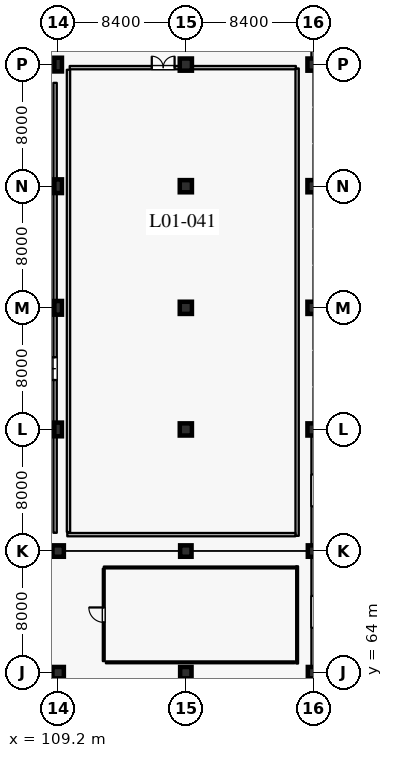
"""IFC4 building model, lengths in metres.
Left out: names, types, materials, properties, quantities, classifications, styles, units other than length and angle.
Written with IfcOpenShell. Run it as: python <this file> out.ifc"""

import sys

from ifc_helpers import new_model, si_unit, direction, frame, frame_2d, origin, origin_2d, place, context, subcontext, project, spatial, rectangle, hollow_rectangle, extrude, element, fill, save


model = new_model("IFC4")
c1 = context("Model", 3, precision=1e-05, world=origin(), true_north=direction((0.0, 1.0)))
c2 = subcontext(c1, "Body", "Model", "MODEL_VIEW")
j1 = project(units=[si_unit("LENGTHUNIT", "METRE"), si_unit("PLANEANGLEUNIT", "RADIAN")], contexts=[c1])
p1 = place(None, origin())
s1 = spatial("IfcSite", under=j1, at=p1, CompositionType="ELEMENT")
p2 = place(p1, origin())
s2 = spatial("IfcBuilding", under=s1, at=p2, CompositionType="ELEMENT")
p3 = place(p2, frame((0.0, 0.0, 6.0)))
s3 = spatial("IfcBuildingStorey", under=s2, at=p3, CompositionType="ELEMENT", Elevation=6.0)
for number, where, z_axis, x_axis in (
    (1, (109.2, 64.0, 0.0), (0.0, 0.0, 1.0), (1.0, 0.0, 0.0)),
    (2, (109.2, 72.0, 0.0), (0.0, 0.0, 1.0), (1.0, 0.0, 0.0)),
):
    element("IfcColumn", number, at=place(p3, frame(where, z_axis=z_axis, x_axis=x_axis)), inside=s3, PredefinedType="COLUMN", context=c2, shape_type="SweptSolid", body=[
        extrude(rectangle(XDim=0.75, YDim=0.75, at=origin_2d()), origin(), (0.0, 0.0, 1.0), 5.4),
    ])
for number, where, z_axis, x_axis in (
    (3, (109.2, 80.0, 0.0), (0.0, 0.0, 1.0), (1.0, 0.0, 0.0)),
    (4, (109.2, 88.0, 0.0), (0.0, 0.0, 1.0), (1.0, 0.0, 0.0)),
    (5, (109.2, 96.0, 0.0), (0.0, 0.0, 1.0), (1.0, 0.0, 0.0)),
    (6, (109.2, 104.0, 0.0), (0.0, 0.0, 1.0), (1.0, 0.0, 0.0)),
):
    element("IfcColumn", number, at=place(p3, frame(where, z_axis=z_axis, x_axis=x_axis)), inside=s3, PredefinedType="COLUMN", context=c2, shape_type="SweptSolid", body=[
        extrude(hollow_rectangle(XDim=0.5, YDim=0.9, WallThickness=0.024, at=origin_2d()), origin(), (0.0, 0.0, 1.0), 5.4),
    ])
for number, where, z_axis, x_axis in (
    (7, (117.6, 64.0, 0.0), (0.0, 0.0, 1.0), (1.0, 0.0, 0.0)),
    (8, (117.6, 72.0, 0.0), (0.0, 0.0, 1.0), (1.0, 0.0, 0.0)),
):
    element("IfcColumn", number, at=place(p3, frame(where, z_axis=z_axis, x_axis=x_axis)), inside=s3, PredefinedType="COLUMN", context=c2, shape_type="SweptSolid", body=[
        extrude(rectangle(XDim=0.75, YDim=0.75, at=origin_2d()), origin(), (0.0, 0.0, 1.0), 5.4),
    ])
for number, where, z_axis, x_axis in (
    (9, (117.6, 80.0, 0.0), (0.0, 0.0, 1.0), (1.0, 0.0, 0.0)),
    (10, (117.6, 88.0, 0.0), (0.0, 0.0, 1.0), (1.0, 0.0, 0.0)),
    (11, (117.6, 96.0, 0.0), (0.0, 0.0, 1.0), (1.0, 0.0, 0.0)),
    (12, (117.6, 104.0, 0.0), (0.0, 0.0, 1.0), (1.0, 0.0, 0.0)),
):
    element("IfcColumn", number, at=place(p3, frame(where, z_axis=z_axis, x_axis=x_axis)), inside=s3, PredefinedType="COLUMN", context=c2, shape_type="SweptSolid", body=[
        extrude(rectangle(XDim=0.8, YDim=0.8, at=origin_2d()), origin(), (0.0, 0.0, 1.0), 5.4),
    ])
for number, where, z_axis, x_axis in (
    (13, (126.0, 64.0, 0.0), (0.0, 0.0, 1.0), (1.0, 0.0, 0.0)),
    (14, (126.0, 72.0, 0.0), (0.0, 0.0, 1.0), (1.0, 0.0, 0.0)),
):
    element("IfcColumn", number, at=place(p3, frame(where, z_axis=z_axis, x_axis=x_axis)), inside=s3, PredefinedType="COLUMN", context=c2, shape_type="SweptSolid", body=[
        extrude(rectangle(XDim=0.75, YDim=0.75, at=origin_2d()), origin(), (0.0, 0.0, 1.0), 5.4),
    ])
for number, where, z_axis, x_axis in (
    (15, (126.0, 80.0, 0.0), (0.0, 0.0, 1.0), (1.0, 0.0, 0.0)),
    (16, (126.0, 88.0, 0.0), (0.0, 0.0, 1.0), (1.0, 0.0, 0.0)),
    (17, (126.0, 96.0, 0.0), (0.0, 0.0, 1.0), (1.0, 0.0, 0.0)),
    (18, (126.0, 104.0, 0.0), (0.0, 0.0, 1.0), (1.0, 0.0, 0.0)),
):
    element("IfcColumn", number, at=place(p3, frame(where, z_axis=z_axis, x_axis=x_axis)), inside=s3, PredefinedType="COLUMN", context=c2, shape_type="SweptSolid", body=[
        extrude(rectangle(XDim=0.8, YDim=0.8, at=origin_2d()), origin(), (0.0, 0.0, 1.0), 5.4),
    ])
p4 = place(p3, frame((126.0, 79.6, 0.0), z_axis=(0.0, 0.0, 1.0), x_axis=(0.0, -1.0, 0.0)))
e19 = element("IfcWall", 19, at=p4, inside=s3, PredefinedType="SOLIDWALL", context=c2, shape_type="SweptSolid", body=[
    extrude(rectangle(XDim=7.225, YDim=0.28, at=frame_2d((3.613, 0.0))), origin(), (0.0, 0.0, 1.0), 4.67),
])
p5 = place(p4, frame((2.562, 0.0, 1.05)))
e20 = element("IfcOpeningElement", 20, at=p5, cuts=e19, PredefinedType="OPENING", context=c2, shape_type="SweptSolid", body=[
    extrude(rectangle(XDim=2.1, YDim=1.1, at=frame_2d((1.05, 0.55))), frame((0.0, 0.15, 0.0), z_axis=(0.0, -1.0, 0.0), x_axis=(1.0, 0.0, 0.0)), (0.0, 0.0, 1.0), 0.3),
])
p6 = place(p3, frame((126.0, 111.6, 0.0), z_axis=(0.0, 0.0, 1.0), x_axis=(0.0, -1.0, 0.0)))
e21 = element("IfcWall", 21, at=p6, inside=s3, PredefinedType="SOLIDWALL", context=c2, shape_type="SweptSolid", body=[
    extrude(rectangle(XDim=7.2, YDim=0.28, at=frame_2d((3.6, 0.0))), origin(), (0.0, 0.0, 1.0), 4.67),
])
p7 = place(p6, frame((2.25, 0.0, 1.05)))
e22 = element("IfcOpeningElement", 22, at=p7, cuts=e21, PredefinedType="OPENING", context=c2, shape_type="SweptSolid", body=[
    extrude(rectangle(XDim=2.7, YDim=1.2, at=frame_2d((1.35, 0.6))), frame((0.0, 0.15, 0.0), z_axis=(0.0, -1.0, 0.0), x_axis=(1.0, 0.0, 0.0)), (0.0, 0.0, 1.0), 0.3),
])
p8 = place(p3, frame((126.0, 71.625, 0.0), z_axis=(0.0, 0.0, 1.0), x_axis=(0.0, -1.0, 0.0)))
e23 = element("IfcWall", 23, at=p8, inside=s3, PredefinedType="SOLIDWALL", context=c2, shape_type="SweptSolid", body=[
    extrude(rectangle(XDim=7.25, YDim=0.28, at=frame_2d((3.625, 0.0))), origin(), (0.0, 0.0, 1.0), 4.67),
])
p9 = place(p8, frame((2.575, 0.0, 1.0)))
e24 = element("IfcOpeningElement", 24, at=p9, cuts=e23, PredefinedType="OPENING", context=c2, shape_type="SweptSolid", body=[
    extrude(rectangle(XDim=2.1, YDim=1.1, at=frame_2d((1.05, 0.55))), frame((0.0, 0.15, 0.0), z_axis=(0.0, -1.0, 0.0), x_axis=(1.0, 0.0, 0.0)), (0.0, 0.0, 1.0), 0.3),
])
p10 = place(p3, frame((126.0, 63.625, 0.0), z_axis=(0.0, 0.0, 1.0), x_axis=(0.0, -1.0, 0.0)))
e25 = element("IfcWall", 25, at=p10, inside=s3, PredefinedType="SOLIDWALL", context=c2, shape_type="SweptSolid", body=[
    extrude(rectangle(XDim=7.25, YDim=0.28, at=frame_2d((3.625, 0.0))), origin(), (0.0, 0.0, 1.0), 5.1),
])
p11 = place(p10, frame((2.275, 0.0, 1.0)))
e26 = element("IfcOpeningElement", 26, at=p11, cuts=e25, PredefinedType="OPENING", context=c2, shape_type="SweptSolid", body=[
    extrude(rectangle(XDim=2.7, YDim=1.2, at=frame_2d((1.35, 0.6))), frame((0.0, 0.15, 0.0), z_axis=(0.0, -1.0, 0.0), x_axis=(1.0, 0.0, 0.0)), (0.0, 0.0, 1.0), 0.3),
])
p12 = place(p3, frame((109.0, 73.2, 0.0), z_axis=(0.0, 0.0, 1.0), x_axis=(0.0, 1.0, 0.0)))
e27 = element("IfcWall", 27, at=p12, inside=s3, PredefinedType="PARTITIONING", context=c2, shape_type="SweptSolid", body=[
    extrude(rectangle(XDim=29.6, YDim=0.22, at=frame_2d((14.8, 0.0))), origin(), (0.0, 0.0, 1.0), 5.045),
])
p13 = place(p12, frame((10.05, 0.0, 0.0)))
e28 = element("IfcOpeningElement", 28, at=p13, cuts=e27, PredefinedType="OPENING", context=c2, shape_type="SweptSolid", body=[
    extrude(rectangle(XDim=1.5, YDim=2.3, at=frame_2d((0.75, 1.15))), frame((0.0, 0.12, 0.0), z_axis=(0.0, -1.0, 0.0), x_axis=(1.0, 0.0, 0.0)), (0.0, 0.0, 1.0), 0.24),
])
p14 = place(p3, frame((109.96, 103.8, 0.0), z_axis=(0.0, 0.0, 1.0), x_axis=(1.0, 0.0, 0.0)))
e29 = element("IfcWall", 29, at=p14, inside=s3, PredefinedType="PARTITIONING", context=c2, shape_type="SweptSolid", body=[
    extrude(rectangle(XDim=14.88, YDim=0.22, at=frame_2d((7.44, 0.0))), origin(), (0.0, 0.0, 1.0), 4.27),
])
p15 = place(p14, frame((5.4, 0.0, 0.0)))
e30 = element("IfcOpeningElement", 30, at=p15, cuts=e29, PredefinedType="OPENING", context=c2, shape_type="SweptSolid", body=[
    extrude(rectangle(XDim=1.5, YDim=2.3, at=frame_2d((0.75, 1.15))), frame((0.0, 0.12, 0.0), z_axis=(0.0, -1.0, 0.0), x_axis=(1.0, 0.0, 0.0)), (0.0, 0.0, 1.0), 0.24),
])
p16 = place(p3, frame((109.88, 73.25, 0.0), z_axis=(0.0, 0.0, 1.0), x_axis=(0.0, 1.0, 0.0)))
e31 = element("IfcWall", 31, at=p16, inside=s3, PredefinedType="PARTITIONING", context=c2, shape_type="SweptSolid", body=[
    extrude(rectangle(XDim=30.41, YDim=0.22, at=frame_2d((15.205, 0.0))), origin(), (0.0, 0.0, 1.0), 5.045),
])
p17 = place(p3, frame((112.2, 64.76, 0.0), z_axis=(0.0, 0.0, 1.0), x_axis=(0.0, 1.0, 0.0)))
e32 = element("IfcWall", 32, at=p17, inside=s3, PredefinedType="PARTITIONING", context=c2, shape_type="SweptSolid", body=[
    extrude(rectangle(XDim=6.08, YDim=0.125, at=frame_2d((3.04, 0.0))), origin(), (0.0, 0.0, 1.0), 5.045),
])
p18 = place(p17, frame((2.55, 0.0, 0.0)))
e33 = element("IfcOpeningElement", 33, at=p18, cuts=e32, PredefinedType="OPENING", context=c2, shape_type="SweptSolid", body=[
    extrude(rectangle(XDim=0.98, YDim=2.15, at=frame_2d((0.49, 1.075))), frame((0.0, 0.073, 0.0), z_axis=(0.0, -1.0, 0.0), x_axis=(1.0, 0.0, 0.0)), (0.0, 0.0, 1.0), 0.145),
])
p19 = place(p3, frame((112.34, 64.68, 0.0), z_axis=(0.0, 0.0, 1.0), x_axis=(1.0, 0.0, 0.0)))
e34 = element("IfcWall", 34, at=p19, inside=s3, PredefinedType="PARTITIONING", context=c2, shape_type="SweptSolid", body=[
    extrude(rectangle(XDim=12.41, YDim=0.125, at=frame_2d((6.205, 0.0))), origin(), (0.0, 0.0, 1.0), 5.045),
])
p20 = place(p3, frame((124.92, 73.0, 0.0), z_axis=(0.0, 0.0, 1.0), x_axis=(0.0, 1.0, 0.0)))
e35 = element("IfcWall", 35, at=p20, inside=s3, PredefinedType="PARTITIONING", context=c2, shape_type="SweptSolid", body=[
    extrude(rectangle(XDim=30.748, YDim=0.22, at=frame_2d((15.374, 0.0))), origin(), (0.0, 0.0, 1.0), 5.045),
])
p21 = place(p3, frame((109.8, 73.08, 0.0), z_axis=(0.0, 0.0, 1.0), x_axis=(1.0, 0.0, 0.0)))
e36 = element("IfcWall", 36, at=p21, inside=s3, PredefinedType="PARTITIONING", context=c2, shape_type="SweptSolid", body=[
    extrude(rectangle(XDim=15.01, YDim=0.22, at=frame_2d((7.505, 0.0))), origin(), (0.0, 0.0, 1.0), 5.045),
])
p22 = place(p3, frame((124.92, 64.6, 0.0), z_axis=(0.0, 0.0, 1.0), x_axis=(0.0, 1.0, 0.0)))
e37 = element("IfcWall", 37, at=p22, inside=s3, PredefinedType="PARTITIONING", context=c2, shape_type="SweptSolid", body=[
    extrude(rectangle(XDim=6.4, YDim=0.125, at=frame_2d((3.2, 0.0))), origin(), (0.0, 0.0, 1.0), 5.045),
])
p23 = place(p3, frame((112.204, 70.92, 0.0), z_axis=(0.0, 0.0, 1.0), x_axis=(1.0, 0.0, 0.0)))
e38 = element("IfcWall", 38, at=p23, inside=s3, PredefinedType="PARTITIONING", context=c2, shape_type="SweptSolid", body=[
    extrude(rectangle(XDim=12.654, YDim=0.125, at=frame_2d((6.327, 0.0))), origin(), (0.0, 0.0, 1.0), 5.045),
])
p24 = place(p5, origin())
e39 = element("IfcWindow", 39, at=p24, inside=s3, PartitioningType="DOUBLE_PANEL_VERTICAL", PredefinedType="WINDOW", context=c2, shape_type="SweptSolid", body=[
    extrude(rectangle(XDim=2.1, YDim=1.1, at=frame_2d((1.05, 0.55))), frame((0.0, 0.03, 0.0), z_axis=(0.0, -1.0, 0.0), x_axis=(1.0, 0.0, 0.0)), (0.0, 0.0, 1.0), 0.06),
])
fill(e20, e39)
p25 = place(p9, origin())
e40 = element("IfcWindow", 40, at=p25, inside=s3, PartitioningType="DOUBLE_PANEL_VERTICAL", PredefinedType="WINDOW", context=c2, shape_type="SweptSolid", body=[
    extrude(rectangle(XDim=2.1, YDim=1.1, at=frame_2d((1.05, 0.55))), frame((0.0, 0.03, 0.0), z_axis=(0.0, -1.0, 0.0), x_axis=(1.0, 0.0, 0.0)), (0.0, 0.0, 1.0), 0.06),
])
fill(e24, e40)
p26 = place(p13, origin())
e41 = element("IfcDoor", 41, at=p26, inside=s3, OperationType="DOUBLE_DOOR_SINGLE_SWING", PredefinedType="DOOR", context=c2, shape_type="SweptSolid", body=[
    extrude(rectangle(XDim=1.5, YDim=2.3, at=frame_2d((0.75, 1.15))), frame((0.0, 0.025, 0.0), z_axis=(0.0, -1.0, 0.0), x_axis=(1.0, 0.0, 0.0)), (0.0, 0.0, 1.0), 0.05),
])
fill(e28, e41)
p27 = place(p15, origin())
e42 = element("IfcDoor", 42, at=p27, inside=s3, OperationType="DOUBLE_DOOR_SINGLE_SWING", PredefinedType="DOOR", context=c2, shape_type="SweptSolid", body=[
    extrude(rectangle(XDim=1.5, YDim=2.3, at=frame_2d((0.75, 1.15))), frame((0.0, 0.025, 0.0), z_axis=(0.0, -1.0, 0.0), x_axis=(1.0, 0.0, 0.0)), (0.0, 0.0, 1.0), 0.05),
])
fill(e30, e42)
p28 = place(p18, origin())
e43 = element("IfcDoor", 43, at=p28, inside=s3, OperationType="SINGLE_SWING_RIGHT", PredefinedType="DOOR", context=c2, shape_type="SweptSolid", body=[
    extrude(rectangle(XDim=0.98, YDim=2.15, at=frame_2d((0.49, 1.075))), frame((0.0, 0.025, 0.0), z_axis=(0.0, -1.0, 0.0), x_axis=(1.0, 0.0, 0.0)), (0.0, 0.0, 1.0), 0.05),
])
fill(e33, e43)
save(model, sys.argv[1])
